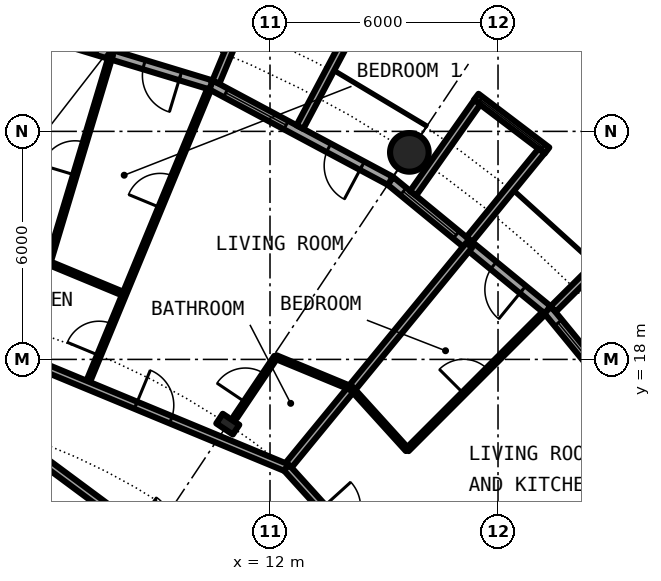
"""IFC4 building model, lengths in metres.
Left out: names, types, materials, properties, quantities, classifications, styles, units other than length and angle.
Written with IfcOpenShell. Run it as: python <this file> out.ifc"""

import sys

from ifc_helpers import new_model, si_unit, direction, frame, frame_2d, origin, origin_2d, place, context, subcontext, project, spatial, rectangle, circle, hollow_circle, i_section, extrude, element, fill, save


model = new_model("IFC4")
c1 = context("Model", 3, precision=1e-05, world=origin(), true_north=direction((0.0, 1.0)))
c2 = subcontext(c1, "Body", "Model", "MODEL_VIEW")
j1 = project(units=[si_unit("LENGTHUNIT", "METRE"), si_unit("PLANEANGLEUNIT", "RADIAN")], contexts=[c1])
p1 = place(None, origin())
s1 = spatial("IfcSite", under=j1, at=p1, CompositionType="ELEMENT")
p2 = place(p1, origin())
s2 = spatial("IfcBuilding", under=s1, at=p2, CompositionType="ELEMENT")
p3 = place(p2, frame((0.0, 0.0, 69.7)))
s3 = spatial("IfcBuildingStorey", under=s2, at=p3, CompositionType="ELEMENT", Elevation=69.7)
p4 = place(p3, frame((15.667, 23.448, 0.0), z_axis=(0.0, 0.0, 1.0), x_axis=(1.0, 0.0, 0.0)))
e1 = element("IfcColumn", 1, at=p4, inside=s3, PredefinedType="COLUMN", context=c2, shape_type="SweptSolid", body=[
    extrude(hollow_circle(Radius=0.508, WallThickness=0.04, at=origin_2d()), origin(), (0.0, 0.0, 1.0), 3.05),
])
p5 = place(p3, frame((10.889, 16.297, 0.0), z_axis=(0.0, 0.0, 1.0), x_axis=(0.55557023302, 0.831469612303, 0.0)))
e2 = element("IfcColumn", 2, at=p5, inside=s3, PredefinedType="COLUMN", context=c2, shape_type="SweptSolid", body=[
    extrude(i_section(OverallWidth=0.306, OverallDepth=0.524, WebThickness=0.021, FlangeThickness=0.04, FilletRadius=0.027, at=origin_2d()), origin(), (0.0, 0.0, 1.0), 3.05),
])
p6 = place(p3, frame((22.699, 15.167, 0.0), z_axis=(0.0, 0.0, 1.0), x_axis=(-0.634382322723, 0.773019449054, 0.0)))
e3 = element("IfcWall", 3, at=p6, inside=s3, PredefinedType="SOLIDWALL", context=c2, shape_type="SweptSolid", body=[
    extrude(rectangle(XDim=5.352, YDim=0.25, at=frame_2d((2.676, 0.0))), origin(), (0.0, 0.0, 1.0), 2.7),
])
p7 = place(p6, frame((0.841, 0.0, 0.0)))
e4 = element("IfcOpeningElement", 4, at=p7, cuts=e3, PredefinedType="OPENING", context=c2, shape_type="SweptSolid", body=[
    extrude(rectangle(XDim=1.0, YDim=2.2, at=frame_2d((0.5, 1.1))), frame((0.0, 0.135, 0.0), z_axis=(0.0, -1.0, 0.0), x_axis=(1.0, 0.0, 0.0)), (0.0, 0.0, 1.0), 0.27),
])
p8 = place(p6, frame((3.111, 0.0, 0.3)))
e5 = element("IfcOpeningElement", 5, at=p8, cuts=e3, PredefinedType="OPENING", context=c2, shape_type="SweptSolid", body=[
    extrude(rectangle(XDim=1.8, YDim=2.1, at=frame_2d((0.9, 1.05))), frame((0.0, 0.135, 0.0), z_axis=(0.0, -1.0, 0.0), x_axis=(1.0, 0.0, 0.0)), (0.0, 0.0, 1.0), 0.27),
])
p9 = place(p3, frame((19.45, 19.323, -0.03), z_axis=(0.0, 0.0, 1.0), x_axis=(0.709727076896, 0.704476739375, 0.0)))
e6 = element("IfcWall", 6, at=p9, inside=s3, PredefinedType="SOLIDWALL", context=c2, shape_type="SweptSolid", body=[
    extrude(rectangle(XDim=2.883, YDim=0.2, at=frame_2d((1.441, 0.0))), origin(), (0.0, 0.0, 1.0), 2.73),
])
p10 = place(p3, frame((19.304, 19.304, 0.0), z_axis=(0.0, 0.0, 1.0), x_axis=(-0.773019449054, 0.634382322723, 0.0)))
e7 = element("IfcWall", 7, at=p10, inside=s3, PredefinedType="SOLIDWALL", context=c2, shape_type="SweptSolid", body=[
    extrude(rectangle(XDim=5.352, YDim=0.25, at=frame_2d((2.676, 0.0))), origin(), (0.0, 0.0, 1.0), 2.7),
])
p11 = place(p10, frame((0.841, 0.0, 0.0)))
e8 = element("IfcOpeningElement", 8, at=p11, cuts=e7, PredefinedType="OPENING", context=c2, shape_type="SweptSolid", body=[
    extrude(rectangle(XDim=1.0, YDim=2.2, at=frame_2d((0.5, 1.1))), frame((0.0, 0.135, 0.0), z_axis=(0.0, -1.0, 0.0), x_axis=(1.0, 0.0, 0.0)), (0.0, 0.0, 1.0), 0.27),
])
p12 = place(p10, frame((3.111, 0.0, 0.3)))
e9 = element("IfcOpeningElement", 9, at=p12, cuts=e7, PredefinedType="OPENING", context=c2, shape_type="SweptSolid", body=[
    extrude(rectangle(XDim=1.8, YDim=2.1, at=frame_2d((0.9, 1.05))), frame((0.0, 0.135, 0.0), z_axis=(0.0, -1.0, 0.0), x_axis=(1.0, 0.0, 0.0)), (0.0, 0.0, 1.0), 0.27),
])
p13 = place(p3, frame((19.289, 23.497, -0.03), z_axis=(0.0, 0.0, 1.0), x_axis=(-0.796842165306, 0.60418752353, 0.0)))
e10 = element("IfcWall", 10, at=p13, inside=s3, PredefinedType="SOLIDWALL", context=c2, shape_type="SweptSolid", body=[
    extrude(rectangle(XDim=2.337, YDim=0.2, at=frame_2d((1.168, 0.0))), origin(), (0.0, 0.0, 1.0), 2.73),
])
p14 = place(p13, frame((0.128, 0.0, 0.33)))
e11 = element("IfcOpeningElement", 11, at=p14, cuts=e10, PredefinedType="OPENING", context=c2, shape_type="SweptSolid", body=[
    extrude(circle(Radius=1.04, at=frame_2d((1.04, 1.04))), frame((0.0, 0.11, 0.0), z_axis=(0.0, -1.0, 0.0), x_axis=(1.0, 0.0, 0.0)), (0.0, 0.0, 1.0), 0.22),
])
p15 = place(p3, frame((17.246, 21.155, -0.03), z_axis=(0.0, 0.0, 1.0), x_axis=(0.631741648902, 0.775179004516, 0.0)))
e12 = element("IfcWall", 12, at=p15, inside=s3, PredefinedType="SOLIDWALL", context=c2, shape_type="SweptSolid", body=[
    extrude(rectangle(XDim=3.006, YDim=0.2, at=frame_2d((1.503, 0.0))), origin(), (0.0, 0.0, 1.0), 2.73),
])
p16 = place(p3, frame((15.765, 22.37, -0.03), z_axis=(0.0, 0.0, 1.0), x_axis=(0.576274612209, 0.817256123454, 0.0)))
e13 = element("IfcWall", 13, at=p16, inside=s3, PredefinedType="SOLIDWALL", context=c2, shape_type="SweptSolid", body=[
    extrude(rectangle(XDim=2.933, YDim=0.2, at=frame_2d((1.466, 0.0))), origin(), (0.0, 0.0, 1.0), 2.73),
])
p17 = place(p3, frame((15.167, 22.699, 0.0), z_axis=(0.0, 0.0, 1.0), x_axis=(-0.881915646801, 0.471407246368, 0.0)))
e14 = element("IfcWall", 14, at=p17, inside=s3, PredefinedType="SOLIDWALL", context=c2, shape_type="SweptSolid", body=[
    extrude(rectangle(XDim=5.352, YDim=0.25, at=frame_2d((2.676, 0.0))), origin(), (0.0, 0.0, 1.0), 2.7),
])
p18 = place(p17, frame((0.841, 0.0, 0.0)))
e15 = element("IfcOpeningElement", 15, at=p18, cuts=e14, PredefinedType="OPENING", context=c2, shape_type="SweptSolid", body=[
    extrude(rectangle(XDim=1.0, YDim=2.2, at=frame_2d((0.5, 1.1))), frame((0.0, 0.135, 0.0), z_axis=(0.0, -1.0, 0.0), x_axis=(1.0, 0.0, 0.0)), (0.0, 0.0, 1.0), 0.27),
])
p19 = place(p17, frame((3.111, 0.0, 0.3)))
e16 = element("IfcOpeningElement", 16, at=p19, cuts=e14, PredefinedType="OPENING", context=c2, shape_type="SweptSolid", body=[
    extrude(rectangle(XDim=1.8, YDim=2.1, at=frame_2d((0.9, 1.05))), frame((0.0, 0.135, 0.0), z_axis=(0.0, -1.0, 0.0), x_axis=(1.0, 0.0, 0.0)), (0.0, 0.0, 1.0), 0.27),
])
p20 = place(p3, frame((12.787, 24.113, -0.03), z_axis=(0.0, 0.0, 1.0), x_axis=(0.468365282436, 0.883534924159, 0.0)))
e17 = element("IfcWall", 17, at=p20, inside=s3, PredefinedType="SOLIDWALL", context=c2, shape_type="SweptSolid", body=[
    extrude(rectangle(XDim=3.006, YDim=0.2, at=frame_2d((1.503, 0.0))), origin(), (0.0, 0.0, 1.0), 2.73),
])
p21 = place(p3, frame((10.575, 25.295, -0.03), z_axis=(0.0, 0.0, 1.0), x_axis=(0.385697364644, 0.922625353492, 0.0)))
e18 = element("IfcWall", 18, at=p21, inside=s3, PredefinedType="SOLIDWALL", context=c2, shape_type="SweptSolid", body=[
    extrude(rectangle(XDim=2.883, YDim=0.2, at=frame_2d((1.442, 0.0))), origin(), (0.0, 0.0, 1.0), 2.73),
])
p22 = place(p3, frame((10.447, 25.222, 0.0), z_axis=(0.0, 0.0, 1.0), x_axis=(-0.956965678721, 0.290201119486, 0.0)))
e19 = element("IfcWall", 19, at=p22, inside=s3, PredefinedType="SOLIDWALL", context=c2, shape_type="SweptSolid", body=[
    extrude(rectangle(XDim=5.351, YDim=0.25, at=frame_2d((2.676, 0.0))), origin(), (0.0, 0.0, 1.0), 2.7),
])
p23 = place(p22, frame((0.841, 0.0, 0.0)))
e20 = element("IfcOpeningElement", 20, at=p23, cuts=e19, PredefinedType="OPENING", context=c2, shape_type="SweptSolid", body=[
    extrude(rectangle(XDim=1.0, YDim=2.2, at=frame_2d((0.5, 1.1))), frame((0.0, 0.135, 0.0), z_axis=(0.0, -1.0, 0.0), x_axis=(1.0, 0.0, 0.0)), (0.0, 0.0, 1.0), 0.27),
])
p24 = place(p22, frame((3.111, 0.0, 0.3)))
e21 = element("IfcOpeningElement", 21, at=p24, cuts=e19, PredefinedType="OPENING", context=c2, shape_type="SweptSolid", body=[
    extrude(rectangle(XDim=1.8, YDim=2.1, at=frame_2d((0.9, 1.05))), frame((0.0, 0.135, 0.0), z_axis=(0.0, -1.0, 0.0), x_axis=(1.0, 0.0, 0.0)), (0.0, 0.0, 1.0), 0.27),
])
p25 = place(p3, frame((7.178, 17.328, 0.0), z_axis=(0.0, 0.0, 1.0), x_axis=(0.382458509789, 0.923972666419, 0.0)))
e22 = element("IfcWall", 22, at=p25, inside=s3, PredefinedType="PARTITIONING", context=c2, shape_type="SweptSolid", body=[
    extrude(rectangle(XDim=8.419, YDim=0.1, at=frame_2d((4.209, 0.0))), origin(), (0.0, 0.0, 1.0), 2.7),
])
p26 = place(p25, frame((0.841, 0.0, 0.0)))
e23 = element("IfcOpeningElement", 23, at=p26, cuts=e22, PredefinedType="OPENING", context=c2, shape_type="SweptSolid", body=[
    extrude(rectangle(XDim=0.9, YDim=2.3, at=frame_2d((0.45, 1.15))), frame((0.0, 0.06, 0.0), z_axis=(0.0, -1.0, 0.0), x_axis=(1.0, 0.0, 0.0)), (0.0, 0.0, 1.0), 0.12),
])
p27 = place(p25, frame((5.051, 0.0, 0.0)))
e24 = element("IfcOpeningElement", 24, at=p27, cuts=e22, PredefinedType="OPENING", context=c2, shape_type="SweptSolid", body=[
    extrude(rectangle(XDim=0.9, YDim=2.3, at=frame_2d((0.45, 1.15))), frame((0.0, 0.06, 0.0), z_axis=(0.0, -1.0, 0.0), x_axis=(1.0, 0.0, 0.0)), (0.0, 0.0, 1.0), 0.12),
])
p28 = place(p3, frame((16.515, 11.034, 0.0), z_axis=(0.0, 0.0, 1.0), x_axis=(0.831382022135, 0.555701298605, 0.0)))
e25 = element("IfcWall", 25, at=p28, inside=s3, PredefinedType="PARTITIONING", context=c2, shape_type="SweptSolid", body=[
    extrude(rectangle(XDim=7.313, YDim=0.2, at=frame_2d((3.657, 0.0))), origin(), (0.0, 0.0, 1.0), 2.7),
])
p29 = place(p3, frame((6.173, 20.541, 0.0), z_axis=(0.0, 0.0, 1.0), x_axis=(0.287793773423, 0.957692405723, 0.0)))
e26 = element("IfcWall", 26, at=p29, inside=s3, PredefinedType="PARTITIONING", context=c2, shape_type="SweptSolid", body=[
    extrude(rectangle(XDim=5.726, YDim=0.1, at=frame_2d((2.863, 0.0))), origin(), (0.0, 0.0, 1.0), 2.7),
])
p30 = place(p29, frame((2.413, 0.0, 0.0)))
e27 = element("IfcOpeningElement", 27, at=p30, cuts=e26, PredefinedType="OPENING", context=c2, shape_type="SweptSolid", body=[
    extrude(rectangle(XDim=0.9, YDim=2.3, at=frame_2d((0.45, 1.15))), frame((0.0, 0.06, 0.0), z_axis=(0.0, -1.0, 0.0), x_axis=(1.0, 0.0, 0.0)), (0.0, 0.0, 1.0), 0.12),
])
p31 = place(p3, frame((11.087, 16.48, 0.0), z_axis=(0.0, 0.0, 1.0), x_axis=(0.558383137663, 0.829583191472, 0.0)))
e28 = element("IfcWall", 28, at=p31, inside=s3, PredefinedType="PARTITIONING", context=c2, shape_type="SweptSolid", body=[
    extrude(rectangle(XDim=1.909, YDim=0.1, at=frame_2d((0.955, 0.0))), origin(), (0.0, 0.0, 1.0), 2.7),
])
p32 = place(p31, frame((0.474, 0.0, 0.0)))
e29 = element("IfcOpeningElement", 29, at=p32, cuts=e28, PredefinedType="OPENING", context=c2, shape_type="SweptSolid", body=[
    extrude(rectangle(XDim=0.9, YDim=2.3, at=frame_2d((0.45, 1.15))), frame((0.0, 0.06, 0.0), z_axis=(0.0, -1.0, 0.0), x_axis=(1.0, 0.0, 0.0)), (0.0, 0.0, 1.0), 0.12),
])
p33 = place(p3, frame((12.435, 15.15, 0.0), z_axis=(0.0, 0.0, 1.0), x_axis=(0.634458323308, 0.772957072537, 0.0)))
e30 = element("IfcWall", 30, at=p33, inside=s3, PredefinedType="PARTITIONING", context=c2, shape_type="SweptSolid", body=[
    extrude(rectangle(XDim=7.576, YDim=0.2, at=frame_2d((3.788, 0.0))), origin(), (0.0, 0.0, 1.0), 2.7),
])
p34 = place(p3, frame((15.612, 15.622, 0.0), z_axis=(0.0, 0.0, 1.0), x_axis=(0.706914880313, 0.707298629994, 0.0)))
e31 = element("IfcWall", 31, at=p34, inside=s3, PredefinedType="PARTITIONING", context=c2, shape_type="SweptSolid", body=[
    extrude(rectangle(XDim=5.09, YDim=0.1, at=frame_2d((2.545, 0.0))), origin(), (0.0, 0.0, 1.0), 2.7),
])
p35 = place(p34, frame((2.095, 0.0, 0.0)))
e32 = element("IfcOpeningElement", 32, at=p35, cuts=e31, PredefinedType="OPENING", context=c2, shape_type="SweptSolid", body=[
    extrude(rectangle(XDim=0.9, YDim=2.3, at=frame_2d((0.45, 1.15))), frame((0.0, 0.06, 0.0), z_axis=(0.0, -1.0, 0.0), x_axis=(1.0, 0.0, 0.0)), (0.0, 0.0, 1.0), 0.12),
])
p36 = place(p3, frame((4.906, 16.172, 0.0), z_axis=(0.0, 0.0, 1.0), x_axis=(0.803204584823, -0.59570327758, 0.0)))
e33 = element("IfcWall", 33, at=p36, inside=s3, PredefinedType="PARTITIONING", context=c2, shape_type="SweptSolid", body=[
    extrude(rectangle(XDim=11.387, YDim=0.2, at=frame_2d((5.693, 0.0))), origin(), (0.0, 0.0, 1.0), 2.7),
])
p37 = place(p36, frame((4.38, 0.0, 0.0)))
e34 = element("IfcOpeningElement", 34, at=p37, cuts=e33, PredefinedType="OPENING", context=c2, shape_type="SweptSolid", body=[
    extrude(rectangle(XDim=1.0, YDim=2.3, at=frame_2d((0.5, 1.15))), frame((0.0, 0.11, 0.0), z_axis=(0.0, -1.0, 0.0), x_axis=(1.0, 0.0, 0.0)), (0.0, 0.0, 1.0), 0.22),
])
p38 = place(p3, frame((1.921, 19.506, 0.0), z_axis=(0.0, 0.0, 1.0), x_axis=(0.923845560554, -0.38276543763, 0.0)))
e35 = element("IfcWall", 35, at=p38, inside=s3, PredefinedType="PARTITIONING", context=c2, shape_type="SweptSolid", body=[
    extrude(rectangle(XDim=11.381, YDim=0.2, at=frame_2d((5.69, 0.0))), origin(), (0.0, 0.0, 1.0), 2.7),
])
p39 = place(p38, frame((7.087, 0.0, 0.0)))
e36 = element("IfcOpeningElement", 36, at=p39, cuts=e35, PredefinedType="OPENING", context=c2, shape_type="SweptSolid", body=[
    extrude(rectangle(XDim=1.0, YDim=2.3, at=frame_2d((0.5, 1.15))), frame((0.0, 0.11, 0.0), z_axis=(0.0, -1.0, 0.0), x_axis=(1.0, 0.0, 0.0)), (0.0, 0.0, 1.0), 0.22),
])
p40 = place(p3, frame((12.434, 15.151, 0.0), z_axis=(0.0, 0.0, 1.0), x_axis=(0.671601747072, -0.740912338492, 0.0)))
e37 = element("IfcWall", 37, at=p40, inside=s3, PredefinedType="PARTITIONING", context=c2, shape_type="SweptSolid", body=[
    extrude(rectangle(XDim=5.597, YDim=0.2, at=frame_2d((2.799, 0.0))), origin(), (0.0, 0.0, 1.0), 2.38),
])
p41 = place(p40, frame((1.417, 0.0, 0.0)))
e38 = element("IfcOpeningElement", 38, at=p41, cuts=e37, PredefinedType="OPENING", context=c2, shape_type="SweptSolid", body=[
    extrude(rectangle(XDim=1.0, YDim=2.3, at=frame_2d((0.5, 1.15))), frame((0.0, 0.11, 0.0), z_axis=(0.0, -1.0, 0.0), x_axis=(1.0, 0.0, 0.0)), (0.0, 0.0, 1.0), 0.22),
])
p42 = place(p3, frame((2.185, 22.193, 0.0), z_axis=(0.0, 0.0, 1.0), x_axis=(0.923844914631, -0.382766996632, 0.0)))
e39 = element("IfcWall", 39, at=p42, inside=s3, PredefinedType="PARTITIONING", context=c2, shape_type="SweptSolid", body=[
    extrude(rectangle(XDim=6.474, YDim=0.1, at=frame_2d((3.237, 0.0))), origin(), (0.0, 0.0, 1.0), 2.7),
])
p43 = place(p3, frame((12.155, 18.062, 0.0), z_axis=(0.0, 0.0, 1.0), x_axis=(0.923874819588, -0.382694810171, 0.0)))
e40 = element("IfcWall", 40, at=p43, inside=s3, PredefinedType="PARTITIONING", context=c2, shape_type="SweptSolid", body=[
    extrude(rectangle(XDim=2.158, YDim=0.1, at=frame_2d((1.079, 0.0))), origin(), (0.0, 0.0, 1.0), 2.7),
])
p44 = place(p3, frame((14.147, 17.238, 0.0), z_axis=(0.0, 0.0, 1.0), x_axis=(0.671674967707, -0.740845960882, 0.0)))
e41 = element("IfcWall", 41, at=p44, inside=s3, PredefinedType="PARTITIONING", context=c2, shape_type="SweptSolid", body=[
    extrude(rectangle(XDim=2.181, YDim=0.1, at=frame_2d((1.091, 0.0))), origin(), (0.0, 0.0, 1.0), 2.7),
])
p45 = place(p8, origin())
e42 = element("IfcWindow", 42, at=p45, inside=s3, PartitioningType="SINGLE_PANEL", PredefinedType="WINDOW", context=c2, shape_type="SweptSolid", body=[
    extrude(rectangle(XDim=1.8, YDim=2.1, at=frame_2d((0.9, 1.05))), frame((0.0, 0.03, 0.0), z_axis=(0.0, -1.0, 0.0), x_axis=(1.0, 0.0, 0.0)), (0.0, 0.0, 1.0), 0.06),
])
fill(e5, e42)
p46 = place(p11, origin())
e43 = element("IfcDoor", 43, at=p46, inside=s3, OperationType="SINGLE_SWING_LEFT", PredefinedType="DOOR", context=c2, shape_type="SweptSolid", body=[
    extrude(rectangle(XDim=1.0, YDim=2.2, at=frame_2d((0.5, 1.1))), frame((0.0, 0.025, 0.0), z_axis=(0.0, -1.0, 0.0), x_axis=(1.0, 0.0, 0.0)), (0.0, 0.0, 1.0), 0.05),
])
fill(e8, e43)
p47 = place(p12, origin())
e44 = element("IfcWindow", 44, at=p47, inside=s3, PartitioningType="SINGLE_PANEL", PredefinedType="WINDOW", context=c2, shape_type="SweptSolid", body=[
    extrude(rectangle(XDim=1.8, YDim=2.1, at=frame_2d((0.9, 1.05))), frame((0.0, 0.03, 0.0), z_axis=(0.0, -1.0, 0.0), x_axis=(1.0, 0.0, 0.0)), (0.0, 0.0, 1.0), 0.06),
])
fill(e9, e44)
p48 = place(p14, origin())
e45 = element("IfcWindow", 45, at=p48, inside=s3, PartitioningType="SINGLE_PANEL", PredefinedType="WINDOW", context=c2, shape_type="SweptSolid", body=[
    extrude(circle(Radius=1.04, at=frame_2d((1.04, 1.04))), frame((0.0, 0.03, 0.0), z_axis=(0.0, -1.0, 0.0), x_axis=(1.0, 0.0, 0.0)), (0.0, 0.0, 1.0), 0.06),
])
fill(e11, e45)
p49 = place(p18, origin())
e46 = element("IfcDoor", 46, at=p49, inside=s3, OperationType="SINGLE_SWING_LEFT", PredefinedType="DOOR", context=c2, shape_type="SweptSolid", body=[
    extrude(rectangle(XDim=1.0, YDim=2.2, at=frame_2d((0.5, 1.1))), frame((0.0, 0.025, 0.0), z_axis=(0.0, -1.0, 0.0), x_axis=(1.0, 0.0, 0.0)), (0.0, 0.0, 1.0), 0.05),
])
fill(e15, e46)
p50 = place(p19, origin())
e47 = element("IfcWindow", 47, at=p50, inside=s3, PartitioningType="SINGLE_PANEL", PredefinedType="WINDOW", context=c2, shape_type="SweptSolid", body=[
    extrude(rectangle(XDim=1.8, YDim=2.1, at=frame_2d((0.9, 1.05))), frame((0.0, 0.03, 0.0), z_axis=(0.0, -1.0, 0.0), x_axis=(1.0, 0.0, 0.0)), (0.0, 0.0, 1.0), 0.06),
])
fill(e16, e47)
p51 = place(p23, origin())
e48 = element("IfcDoor", 48, at=p51, inside=s3, OperationType="SINGLE_SWING_LEFT", PredefinedType="DOOR", context=c2, shape_type="SweptSolid", body=[
    extrude(rectangle(XDim=1.0, YDim=2.2, at=frame_2d((0.5, 1.1))), frame((0.0, 0.025, 0.0), z_axis=(0.0, -1.0, 0.0), x_axis=(1.0, 0.0, 0.0)), (0.0, 0.0, 1.0), 0.05),
])
fill(e20, e48)
p52 = place(p35, origin())
e49 = element("IfcDoor", 49, at=p52, inside=s3, OperationType="SINGLE_SWING_LEFT", PredefinedType="DOOR", context=c2, shape_type="SweptSolid", body=[
    extrude(rectangle(XDim=0.9, YDim=2.3, at=frame_2d((0.45, 1.15))), frame((0.0, 0.025, 0.0), z_axis=(0.0, -1.0, 0.0), x_axis=(1.0, 0.0, 0.0)), (0.0, 0.0, 1.0), 0.05),
])
fill(e32, e49)
p53 = place(p39, origin())
e50 = element("IfcDoor", 50, at=p53, inside=s3, OperationType="SINGLE_SWING_RIGHT", PredefinedType="DOOR", context=c2, shape_type="SweptSolid", body=[
    extrude(rectangle(XDim=1.0, YDim=2.3, at=frame_2d((0.5, 1.15))), frame((0.0, 0.025, 0.0), z_axis=(0.0, -1.0, 0.0), x_axis=(1.0, 0.0, 0.0)), (0.0, 0.0, 1.0), 0.05),
])
fill(e36, e50)
p54 = place(p32, origin())
e51 = element("IfcDoor", 51, at=p54, inside=s3, OperationType="SINGLE_SWING_LEFT", PredefinedType="DOOR", context=c2, shape_type="SweptSolid", body=[
    extrude(rectangle(XDim=0.9, YDim=2.3, at=frame_2d((0.45, 1.15))), frame((0.0, 0.025, 0.0), z_axis=(0.0, -1.0, 0.0), x_axis=(1.0, 0.0, 0.0)), (0.0, 0.0, 1.0), 0.05),
])
fill(e29, e51)
p55 = place(p26, origin())
e52 = element("IfcDoor", 52, at=p55, inside=s3, OperationType="SINGLE_SWING_LEFT", PredefinedType="DOOR", context=c2, shape_type="SweptSolid", body=[
    extrude(rectangle(XDim=0.9, YDim=2.3, at=frame_2d((0.45, 1.15))), frame((0.0, 0.025, 0.0), z_axis=(0.0, -1.0, 0.0), x_axis=(1.0, 0.0, 0.0)), (0.0, 0.0, 1.0), 0.05),
])
fill(e23, e52)
p56 = place(p27, origin())
e53 = element("IfcDoor", 53, at=p56, inside=s3, OperationType="SINGLE_SWING_RIGHT", PredefinedType="DOOR", context=c2, shape_type="SweptSolid", body=[
    extrude(rectangle(XDim=0.9, YDim=2.3, at=frame_2d((0.45, 1.15))), frame((0.0, 0.025, 0.0), z_axis=(0.0, -1.0, 0.0), x_axis=(1.0, 0.0, 0.0)), (0.0, 0.0, 1.0), 0.05),
])
fill(e24, e53)
p57 = place(p30, origin())
e54 = element("IfcDoor", 54, at=p57, inside=s3, OperationType="SINGLE_SWING_RIGHT", PredefinedType="DOOR", context=c2, shape_type="SweptSolid", body=[
    extrude(rectangle(XDim=0.9, YDim=2.3, at=frame_2d((0.45, 1.15))), frame((0.0, 0.025, 0.0), z_axis=(0.0, -1.0, 0.0), x_axis=(1.0, 0.0, 0.0)), (0.0, 0.0, 1.0), 0.05),
])
fill(e27, e54)
save(model, sys.argv[1])
